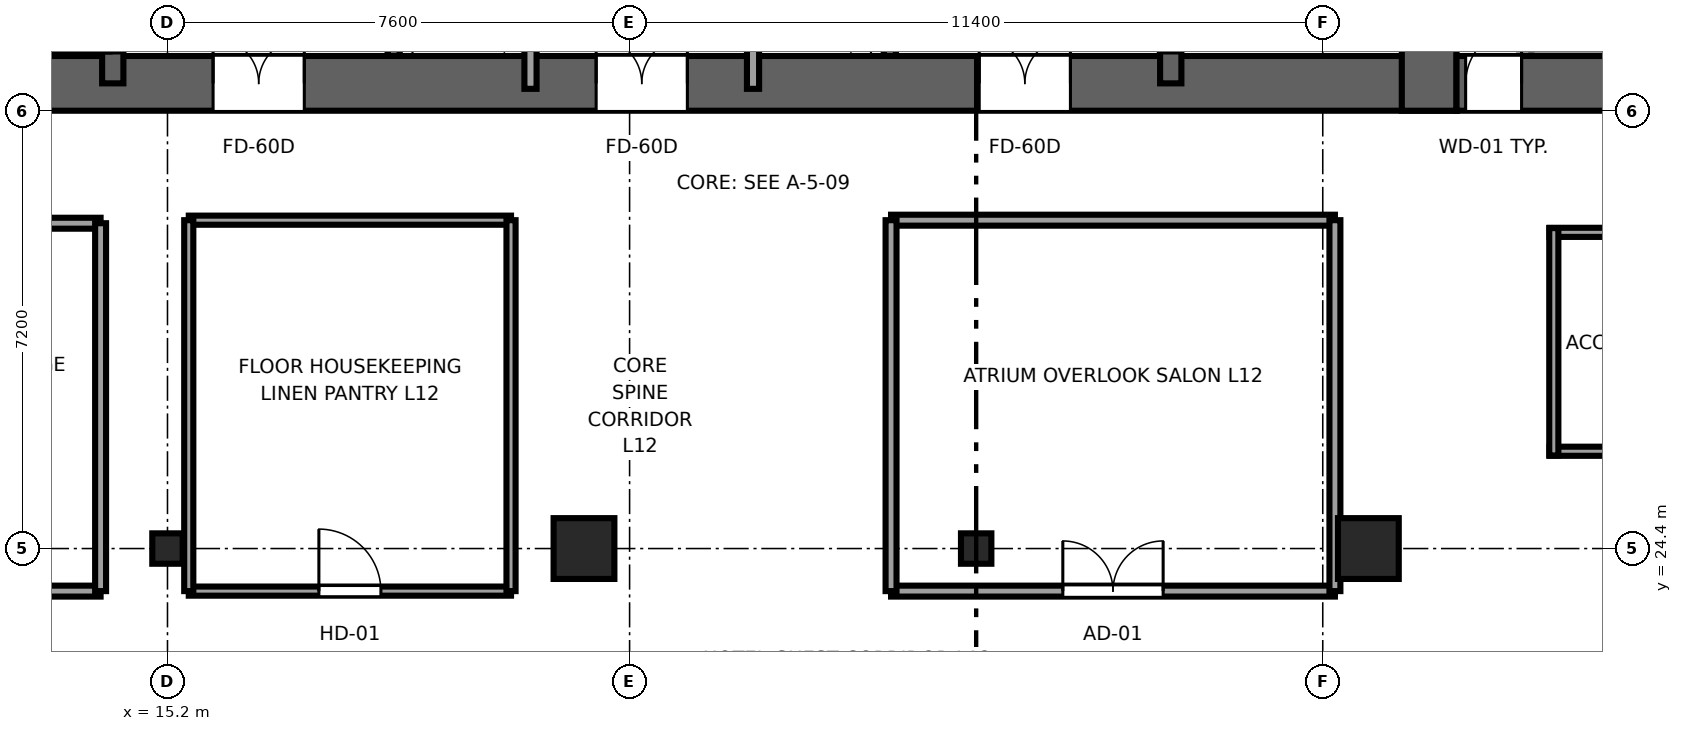
"""IFC4 building model, lengths in metres.
Left out: names, types, materials, properties, quantities, classifications, styles, units other than length and angle.
Written with IfcOpenShell. Run it as: python <this file> out.ifc"""

import sys

from ifc_helpers import new_model, si_unit, direction, frame, frame_2d, origin, origin_2d, place, context, subcontext, project, spatial, rectangle, i_section, extrude, source, transform, mapped, element, fill, save


model = new_model("IFC4")
c1 = context("Model", 3, precision=1e-05, world=origin(), true_north=direction((0.0, 1.0)))
c2 = subcontext(c1, "Body", "Model", "MODEL_VIEW")
j1 = project(units=[si_unit("LENGTHUNIT", "METRE"), si_unit("PLANEANGLEUNIT", "RADIAN")], contexts=[c1])
p1 = place(None, origin())
s1 = spatial("IfcSite", under=j1, at=p1, CompositionType="ELEMENT")
p2 = place(p1, origin())
s2 = spatial("IfcBuilding", under=s1, at=p2, CompositionType="ELEMENT")
p3 = place(p2, frame((0.0, 0.0, 53.3)))
s3 = spatial("IfcBuildingStorey", under=s2, at=p3, CompositionType="ELEMENT", Elevation=53.3)
p4 = place(p3, frame((9.6, 32.05, 0.0), z_axis=(0.0, 0.0, 1.0), x_axis=(1.0, 0.0, 0.0)))
e1 = element("IfcWall", 1, at=p4, inside=s3, PredefinedType="SHEAR", context=c2, shape_type="SweptSolid", body=[
    extrude(rectangle(XDim=26.8, YDim=0.9, at=frame_2d((13.4, 0.0))), origin(), (0.0, 0.0, 1.0), 3.55),
])
p5 = place(p4, frame((7.85, 0.0, 0.0), z_axis=(0.0, 0.0, 1.0), x_axis=(-1.0, 0.0, 0.0)))
e2 = element("IfcOpeningElement", 2, at=p5, cuts=e1, PredefinedType="OPENING", context=c2, shape_type="SweptSolid", body=[
    extrude(rectangle(XDim=1.5, YDim=2.04, at=frame_2d((0.75, 1.02))), frame((0.0, 0.46, 0.0), z_axis=(0.0, -1.0, 0.0), x_axis=(1.0, 0.0, 0.0)), (0.0, 0.0, 1.0), 0.92),
])
p6 = place(p4, frame((14.15, 0.0, 0.0), z_axis=(0.0, 0.0, 1.0), x_axis=(-1.0, 0.0, 0.0)))
e3 = element("IfcOpeningElement", 3, at=p6, cuts=e1, PredefinedType="OPENING", context=c2, shape_type="SweptSolid", body=[
    extrude(rectangle(XDim=1.5, YDim=2.04, at=frame_2d((0.75, 1.02))), frame((0.0, 0.46, 0.0), z_axis=(0.0, -1.0, 0.0), x_axis=(1.0, 0.0, 0.0)), (0.0, 0.0, 1.0), 0.92),
])
p7 = place(p4, frame((20.45, 0.0, 0.0), z_axis=(0.0, 0.0, 1.0), x_axis=(-1.0, 0.0, 0.0)))
e4 = element("IfcOpeningElement", 4, at=p7, cuts=e1, PredefinedType="OPENING", context=c2, shape_type="SweptSolid", body=[
    extrude(rectangle(XDim=1.5, YDim=2.04, at=frame_2d((0.75, 1.02))), frame((0.0, 0.46, 0.0), z_axis=(0.0, -1.0, 0.0), x_axis=(1.0, 0.0, 0.0)), (0.0, 0.0, 1.0), 0.92),
])
p8 = place(p3, frame((35.95, 31.6, 0.0), z_axis=(0.0, 0.0, 1.0), x_axis=(0.0, 1.0, 0.0)))
e5 = element("IfcWall", 5, at=p8, inside=s3, PredefinedType="SHEAR", context=c2, shape_type="SweptSolid", body=[
    extrude(rectangle(XDim=13.6, YDim=0.9, at=frame_2d((6.8, 0.0))), origin(), (0.0, 0.0, 1.0), 3.55),
])
p9 = place(p3, frame((14.3, 32.05, 0.0), z_axis=(0.0, 0.0, 1.0), x_axis=(0.0, 1.0, 0.0)))
e6 = element("IfcWall", 6, at=p9, inside=s3, PredefinedType="SHEAR", context=c2, shape_type="SweptSolid", body=[
    extrude(rectangle(XDim=12.7, YDim=0.35, at=frame_2d((6.35, 0.0))), origin(), (0.0, 0.0, 1.0), 3.55),
])
p10 = place(p9, frame((0.5, 0.0, 0.0)))
e7 = element("IfcOpeningElement", 7, at=p10, cuts=e6, PredefinedType="OPENING", context=c2, shape_type="SweptSolid", body=[
    extrude(rectangle(XDim=1.1, YDim=2.12, at=frame_2d((0.55, 1.06))), frame((0.0, 0.185, 0.0), z_axis=(0.0, -1.0, 0.0), x_axis=(1.0, 0.0, 0.0)), (0.0, 0.0, 1.0), 0.37),
])
p11 = place(p3, frame((31.7, 32.05, 0.0), z_axis=(0.0, 0.0, 1.0), x_axis=(0.0, 1.0, 0.0)))
e8 = element("IfcWall", 8, at=p11, inside=s3, PredefinedType="SHEAR", context=c2, shape_type="SweptSolid", body=[
    extrude(rectangle(XDim=12.7, YDim=0.35, at=frame_2d((6.35, 0.0))), origin(), (0.0, 0.0, 1.0), 3.55),
])
p12 = place(p11, frame((1.6, 0.0, 0.0), z_axis=(0.0, 0.0, 1.0), x_axis=(-1.0, 0.0, 0.0)))
e9 = element("IfcOpeningElement", 9, at=p12, cuts=e8, PredefinedType="OPENING", context=c2, shape_type="SweptSolid", body=[
    extrude(rectangle(XDim=1.1, YDim=2.12, at=frame_2d((0.55, 1.06))), frame((0.0, 0.185, 0.0), z_axis=(0.0, -1.0, 0.0), x_axis=(1.0, 0.0, 0.0)), (0.0, 0.0, 1.0), 0.37),
])
p13 = place(p3, frame((36.4, 32.05, 0.0), z_axis=(0.0, 0.0, 1.0), x_axis=(1.0, 0.0, 0.0)))
e10 = element("IfcWall", 10, at=p13, inside=s3, PredefinedType="SHEAR", context=c2, shape_type="SweptSolid", body=[
    extrude(rectangle(XDim=4.0, YDim=0.9, at=frame_2d((2.0, 0.0))), origin(), (0.0, 0.0, 1.0), 3.55),
])
p14 = place(p13, frame((1.07, 0.0, 0.0), z_axis=(0.0, 0.0, 1.0), x_axis=(-1.0, 0.0, 0.0)))
e11 = element("IfcOpeningElement", 11, at=p14, cuts=e10, PredefinedType="OPENING", context=c2, shape_type="SweptSolid", body=[
    extrude(rectangle(XDim=0.92, YDim=2.01, at=frame_2d((0.46, 1.005))), frame((0.0, 0.46, 0.0), z_axis=(0.0, -1.0, 0.0), x_axis=(1.0, 0.0, 0.0)), (0.0, 0.0, 1.0), 0.92),
])
m1 = source(origin(), c2, "Body", "SweptSolid", [
    extrude(i_section(OverallWidth=0.5, OverallDepth=0.5, WebThickness=0.028, FlangeThickness=0.045, at=origin_2d()), origin(), (0.0, 0.0, 1.0), 3.55),
])
p15 = place(p3, frame((15.2, 24.4, 0.0), z_axis=(0.0, 0.0, 1.0), x_axis=(1.0, 0.0, 0.0)))
e12 = element("IfcColumn", 12, at=p15, inside=s3, PredefinedType="COLUMN", context=c2, shape_type="MappedRepresentation", body=[
    mapped(m1, transform((0.0, 0.0, 0.0), x_axis=(1.0, 0.0, 0.0), y_axis=(0.0, 1.0, 0.0), z_axis=(0.0, 0.0, 1.0), scale=1.0)),
])
m2 = source(origin(), c2, "Body", "SweptSolid", [
    extrude(rectangle(XDim=1.0, YDim=1.0, at=origin_2d()), origin(), (0.0, 0.0, 1.0), 3.55),
])
for number, where, z_axis, x_axis in (
    (13, (22.05, 24.4, 0.0), (0.0, 0.0, 1.0), (1.0, 0.0, 0.0)),
    (14, (34.95, 24.4, 0.0), (0.0, 0.0, 1.0), (1.0, 0.0, 0.0)),
):
    element("IfcColumn", number, at=place(p3, frame(where, z_axis=z_axis, x_axis=x_axis)), inside=s3, PredefinedType="COLUMN", context=c2, shape_type="MappedRepresentation", body=[
        mapped(m2, transform((0.0, 0.0, 0.0), x_axis=(1.0, 0.0, 0.0), y_axis=(0.0, 1.0, 0.0), z_axis=(0.0, 0.0, 1.0), scale=1.0)),
    ])
p16 = place(p3, frame((28.5, 24.4, 0.0), z_axis=(0.0, 0.0, 1.0), x_axis=(1.0, 0.0, 0.0)))
e15 = element("IfcColumn", 15, at=p16, inside=s3, PredefinedType="COLUMN", context=c2, shape_type="MappedRepresentation", body=[
    mapped(m1, transform((0.0, 0.0, 0.0), x_axis=(1.0, 0.0, 0.0), y_axis=(0.0, 1.0, 0.0), z_axis=(0.0, 0.0, 1.0), scale=1.0)),
])
for number, where, z_axis, x_axis in (
    (16, (18.92, 32.504, 0.0), (0.0, 0.0, 1.0), (0.0, 1.0, 0.0)),
    (17, (27.08, 32.504, 0.0), (0.0, 0.0, 1.0), (0.0, 1.0, 0.0)),
):
    element("IfcWall", number, at=place(p3, frame(where, z_axis=z_axis, x_axis=x_axis)), inside=s3, PredefinedType="SOLIDWALL", context=c2, shape_type="SweptSolid", body=[
        extrude(rectangle(XDim=3.646, YDim=0.2, at=frame_2d((1.823, 0.0))), origin(), (0.0, 0.0, 1.0), 3.37),
    ])
for number, where, z_axis, x_axis in (
    (18, (21.17, 31.96, 0.0), (0.0, 0.0, 1.0), (0.0, 1.0, 0.0)),
    (19, (24.83, 31.96, 0.0), (0.0, 0.0, 1.0), (0.0, 1.0, 0.0)),
):
    element("IfcWall", number, at=place(p3, frame(where, z_axis=z_axis, x_axis=x_axis)), inside=s3, PredefinedType="SOLIDWALL", context=c2, shape_type="SweptSolid", body=[
        extrude(rectangle(XDim=12.58, YDim=0.2, at=frame_2d((6.29, 0.0))), origin(), (0.0, 0.0, 1.0), 3.37),
    ])
for number, where, z_axis, x_axis in (
    (20, (37.93, 26.0, 0.0), (0.0, 0.0, 1.0), (1.0, 0.0, 0.0)),
    (21, (37.93, 29.6, 0.0), (0.0, 0.0, 1.0), (1.0, 0.0, 0.0)),
):
    element("IfcWall", number, at=place(p3, frame(where, z_axis=z_axis, x_axis=x_axis)), inside=s3, PredefinedType="PARTITIONING", context=c2, shape_type="SweptSolid", body=[
        extrude(rectangle(XDim=4.4, YDim=0.15, at=frame_2d((2.2, 0.0))), origin(), (0.0, 0.0, 1.0), 3.37),
    ])
p17 = place(p3, frame((38.0, 25.93, 0.0), z_axis=(0.0, 0.0, 1.0), x_axis=(0.0, 1.0, 0.0)))
e22 = element("IfcWall", 22, at=p17, inside=s3, PredefinedType="PARTITIONING", context=c2, shape_type="SweptSolid", body=[
    extrude(rectangle(XDim=3.74, YDim=0.15, at=frame_2d((1.87, 0.0))), origin(), (0.0, 0.0, 1.0), 3.37),
])
p18 = place(p3, frame((9.88, 23.7, 0.0), z_axis=(0.0, 0.0, 1.0), x_axis=(1.0, 0.0, 0.0)))
e23 = element("IfcWall", 23, at=p18, inside=s3, PredefinedType="PARTITIONING", context=c2, shape_type="SweptSolid", body=[
    extrude(rectangle(XDim=4.22, YDim=0.18, at=frame_2d((2.11, 0.0))), origin(), (0.0, 0.0, 1.0), 3.37),
])
p19 = place(p18, frame((1.285, 0.0, 0.0)))
e24 = element("IfcOpeningElement", 24, at=p19, cuts=e23, PredefinedType="OPENING", context=c2, shape_type="SweptSolid", body=[
    extrude(rectangle(XDim=1.65, YDim=2.15, at=frame_2d((0.825, 1.075))), frame((0.0, 0.1, 0.0), z_axis=(0.0, -1.0, 0.0), x_axis=(1.0, 0.0, 0.0)), (0.0, 0.0, 1.0), 0.2),
])
p20 = place(p3, frame((9.88, 29.75, 0.0), z_axis=(0.0, 0.0, 1.0), x_axis=(1.0, 0.0, 0.0)))
e25 = element("IfcWall", 25, at=p20, inside=s3, PredefinedType="PARTITIONING", context=c2, shape_type="SweptSolid", body=[
    extrude(rectangle(XDim=4.22, YDim=0.18, at=frame_2d((2.11, 0.0))), origin(), (0.0, 0.0, 1.0), 3.37),
])
p21 = place(p3, frame((14.1, 23.7, 0.0), z_axis=(0.0, 0.0, 1.0), x_axis=(0.0, 1.0, 0.0)))
e26 = element("IfcWall", 26, at=p21, inside=s3, PredefinedType="PARTITIONING", context=c2, shape_type="SweptSolid", body=[
    extrude(rectangle(XDim=6.05, YDim=0.18, at=frame_2d((3.025, 0.0))), origin(), (0.0, 0.0, 1.0), 3.37),
])
p22 = place(p3, frame((27.1, 23.7, 0.0), z_axis=(0.0, 0.0, 1.0), x_axis=(1.0, 0.0, 0.0)))
e27 = element("IfcWall", 27, at=p22, inside=s3, PredefinedType="PARTITIONING", context=c2, shape_type="SweptSolid", body=[
    extrude(rectangle(XDim=7.3, YDim=0.18, at=frame_2d((3.65, 0.0))), origin(), (0.0, 0.0, 1.0), 3.37),
])
p23 = place(p22, frame((2.825, 0.0, 0.0)))
e28 = element("IfcOpeningElement", 28, at=p23, cuts=e27, PredefinedType="OPENING", context=c2, shape_type="SweptSolid", body=[
    extrude(rectangle(XDim=1.65, YDim=2.15, at=frame_2d((0.825, 1.075))), frame((0.0, 0.1, 0.0), z_axis=(0.0, -1.0, 0.0), x_axis=(1.0, 0.0, 0.0)), (0.0, 0.0, 1.0), 0.2),
])
p24 = place(p3, frame((27.1, 29.8, 0.0), z_axis=(0.0, 0.0, 1.0), x_axis=(1.0, 0.0, 0.0)))
e29 = element("IfcWall", 29, at=p24, inside=s3, PredefinedType="PARTITIONING", context=c2, shape_type="SweptSolid", body=[
    extrude(rectangle(XDim=7.3, YDim=0.18, at=frame_2d((3.65, 0.0))), origin(), (0.0, 0.0, 1.0), 3.37),
])
for number, where, z_axis, x_axis in (
    (30, (27.1, 23.7, 0.0), (0.0, 0.0, 1.0), (0.0, 1.0, 0.0)),
    (31, (34.4, 23.7, 0.0), (0.0, 0.0, 1.0), (0.0, 1.0, 0.0)),
):
    element("IfcWall", number, at=place(p3, frame(where, z_axis=z_axis, x_axis=x_axis)), inside=s3, PredefinedType="PARTITIONING", context=c2, shape_type="SweptSolid", body=[
        extrude(rectangle(XDim=6.1, YDim=0.18, at=frame_2d((3.05, 0.0))), origin(), (0.0, 0.0, 1.0), 3.37),
    ])
p25 = place(p3, frame((15.55, 23.7, 0.0), z_axis=(0.0, 0.0, 1.0), x_axis=(1.0, 0.0, 0.0)))
e32 = element("IfcWall", 32, at=p25, inside=s3, PredefinedType="PARTITIONING", context=c2, shape_type="SweptSolid", body=[
    extrude(rectangle(XDim=5.3, YDim=0.15, at=frame_2d((2.65, 0.0))), origin(), (0.0, 0.0, 1.0), 3.37),
])
p26 = place(p25, frame((2.14, 0.0, 0.0)))
e33 = element("IfcOpeningElement", 33, at=p26, cuts=e32, PredefinedType="OPENING", context=c2, shape_type="SweptSolid", body=[
    extrude(rectangle(XDim=1.02, YDim=2.03, at=frame_2d((0.51, 1.015))), frame((0.0, 0.085, 0.0), z_axis=(0.0, -1.0, 0.0), x_axis=(1.0, 0.0, 0.0)), (0.0, 0.0, 1.0), 0.17),
])
p27 = place(p3, frame((15.55, 29.8, 0.0), z_axis=(0.0, 0.0, 1.0), x_axis=(1.0, 0.0, 0.0)))
e34 = element("IfcWall", 34, at=p27, inside=s3, PredefinedType="PARTITIONING", context=c2, shape_type="SweptSolid", body=[
    extrude(rectangle(XDim=5.3, YDim=0.15, at=frame_2d((2.65, 0.0))), origin(), (0.0, 0.0, 1.0), 3.37),
])
for number, where, z_axis, x_axis in (
    (35, (15.55, 23.7, 0.0), (0.0, 0.0, 1.0), (0.0, 1.0, 0.0)),
    (36, (20.85, 23.7, 0.0), (0.0, 0.0, 1.0), (0.0, 1.0, 0.0)),
):
    element("IfcWall", number, at=place(p3, frame(where, z_axis=z_axis, x_axis=x_axis)), inside=s3, PredefinedType="PARTITIONING", context=c2, shape_type="SweptSolid", body=[
        extrude(rectangle(XDim=6.1, YDim=0.15, at=frame_2d((3.05, 0.0))), origin(), (0.0, 0.0, 1.0), 3.37),
    ])
m3 = source(origin(), c2, "Body", "SweptSolid", [
    extrude(rectangle(XDim=1.1, YDim=2.12, at=frame_2d((0.55, 1.06))), frame((0.0, 0.025, 0.0), z_axis=(0.0, -1.0, 0.0), x_axis=(1.0, 0.0, 0.0)), (0.0, 0.0, 1.0), 0.05),
])
p28 = place(p10, origin())
e37 = element("IfcDoor", 37, at=p28, inside=s3, OperationType="SINGLE_SWING_LEFT", PredefinedType="DOOR", context=c2, shape_type="MappedRepresentation", body=[
    mapped(m3, transform((0.0, 0.0, 0.0), x_axis=(1.0, 0.0, 0.0), y_axis=(0.0, 1.0, 0.0), z_axis=(0.0, 0.0, 1.0), scale=1.0)),
])
fill(e7, e37)
p29 = place(p12, origin())
e38 = element("IfcDoor", 38, at=p29, inside=s3, OperationType="SINGLE_SWING_RIGHT", PredefinedType="DOOR", context=c2, shape_type="MappedRepresentation", body=[
    mapped(m3, transform((0.0, 0.0, 0.0), x_axis=(1.0, 0.0, 0.0), y_axis=(0.0, 1.0, 0.0), z_axis=(0.0, 0.0, 1.0), scale=1.0)),
])
fill(e9, e38)
m4 = source(origin(), c2, "Body", "SweptSolid", [
    extrude(rectangle(XDim=1.5, YDim=2.04, at=frame_2d((0.75, 1.02))), frame((0.0, 0.025, 0.0), z_axis=(0.0, -1.0, 0.0), x_axis=(1.0, 0.0, 0.0)), (0.0, 0.0, 1.0), 0.05),
])
p30 = place(p5, origin())
e39 = element("IfcDoor", 39, at=p30, inside=s3, OperationType="DOUBLE_DOOR_SINGLE_SWING", PredefinedType="DOOR", context=c2, shape_type="MappedRepresentation", body=[
    mapped(m4, transform((0.0, 0.0, 0.0), x_axis=(1.0, 0.0, 0.0), y_axis=(0.0, 1.0, 0.0), z_axis=(0.0, 0.0, 1.0), scale=1.0)),
])
fill(e2, e39)
p31 = place(p6, origin())
e40 = element("IfcDoor", 40, at=p31, inside=s3, OperationType="DOUBLE_DOOR_SINGLE_SWING", PredefinedType="DOOR", context=c2, shape_type="MappedRepresentation", body=[
    mapped(m4, transform((0.0, 0.0, 0.0), x_axis=(1.0, 0.0, 0.0), y_axis=(0.0, 1.0, 0.0), z_axis=(0.0, 0.0, 1.0), scale=1.0)),
])
fill(e3, e40)
p32 = place(p7, origin())
e41 = element("IfcDoor", 41, at=p32, inside=s3, OperationType="DOUBLE_DOOR_SINGLE_SWING", PredefinedType="DOOR", context=c2, shape_type="MappedRepresentation", body=[
    mapped(m4, transform((0.0, 0.0, 0.0), x_axis=(1.0, 0.0, 0.0), y_axis=(0.0, 1.0, 0.0), z_axis=(0.0, 0.0, 1.0), scale=1.0)),
])
fill(e4, e41)
m5 = source(origin(), c2, "Body", "SweptSolid", [
    extrude(rectangle(XDim=0.92, YDim=2.01, at=frame_2d((0.46, 1.005))), frame((0.0, 0.025, 0.0), z_axis=(0.0, -1.0, 0.0), x_axis=(1.0, 0.0, 0.0)), (0.0, 0.0, 1.0), 0.05),
])
p33 = place(p14, origin())
e42 = element("IfcDoor", 42, at=p33, inside=s3, OperationType="SINGLE_SWING_RIGHT", PredefinedType="DOOR", context=c2, shape_type="MappedRepresentation", body=[
    mapped(m5, transform((0.0, 0.0, 0.0), x_axis=(1.0, 0.0, 0.0), y_axis=(0.0, 1.0, 0.0), z_axis=(0.0, 0.0, 1.0), scale=1.0)),
])
fill(e11, e42)
m6 = source(origin(), c2, "Body", "SweptSolid", [
    extrude(rectangle(XDim=1.65, YDim=2.15, at=frame_2d((0.825, 1.075))), frame((0.0, 0.025, 0.0), z_axis=(0.0, -1.0, 0.0), x_axis=(1.0, 0.0, 0.0)), (0.0, 0.0, 1.0), 0.05),
])
p34 = place(p23, origin())
e43 = element("IfcDoor", 43, at=p34, inside=s3, OperationType="DOUBLE_DOOR_SINGLE_SWING", PredefinedType="DOOR", context=c2, shape_type="MappedRepresentation", body=[
    mapped(m6, transform((0.0, 0.0, 0.0), x_axis=(1.0, 0.0, 0.0), y_axis=(0.0, 1.0, 0.0), z_axis=(0.0, 0.0, 1.0), scale=1.0)),
])
fill(e28, e43)
m7 = source(origin(), c2, "Body", "SweptSolid", [
    extrude(rectangle(XDim=1.02, YDim=2.03, at=frame_2d((0.51, 1.015))), frame((0.0, 0.025, 0.0), z_axis=(0.0, -1.0, 0.0), x_axis=(1.0, 0.0, 0.0)), (0.0, 0.0, 1.0), 0.05),
])
p35 = place(p26, origin())
e44 = element("IfcDoor", 44, at=p35, inside=s3, OperationType="SINGLE_SWING_LEFT", PredefinedType="DOOR", context=c2, shape_type="MappedRepresentation", body=[
    mapped(m7, transform((0.0, 0.0, 0.0), x_axis=(1.0, 0.0, 0.0), y_axis=(0.0, 1.0, 0.0), z_axis=(0.0, 0.0, 1.0), scale=1.0)),
])
fill(e33, e44)
save(model, sys.argv[1])
